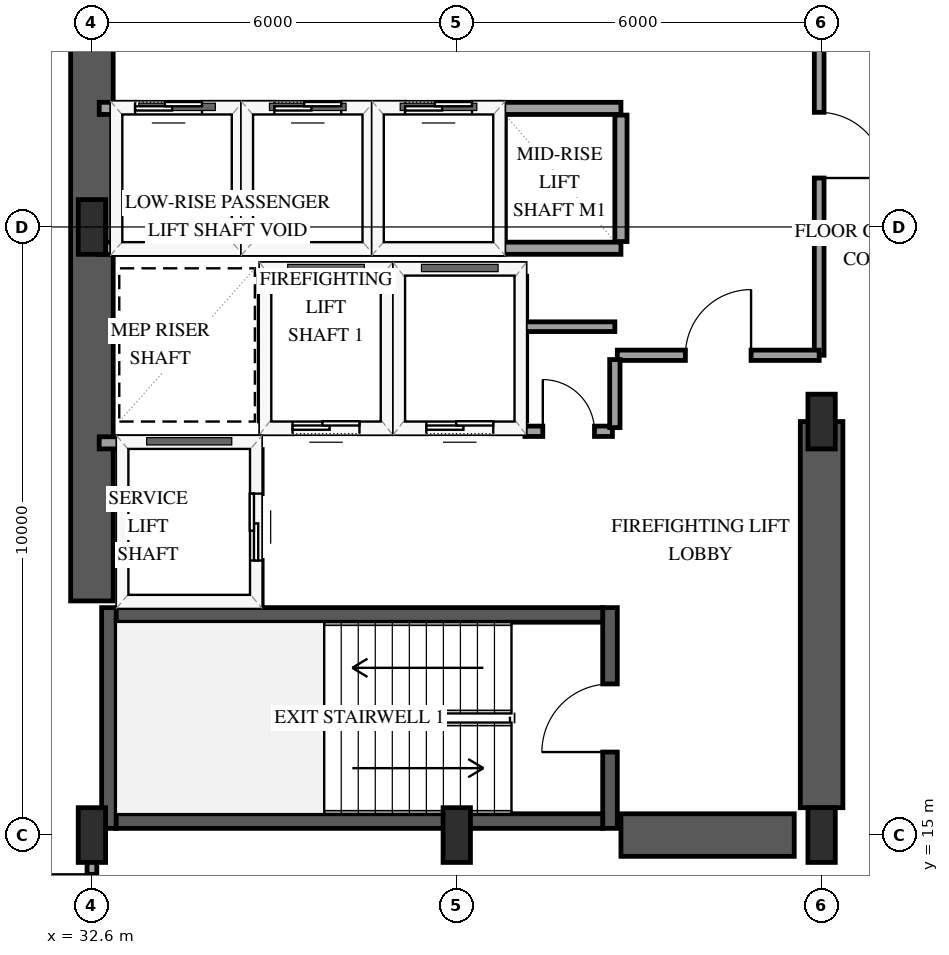
"""IFC4 building model, lengths in metres.
Left out: names, types, materials, properties, quantities, classifications, styles, units other than length and angle.
Written with IfcOpenShell. Run it as: python <this file> out.ifc"""

import sys

from ifc_helpers import new_model, si_unit, direction, frame, frame_2d, origin, origin_2d, place, context, subcontext, project, spatial, rectangle, extrude, element, fill, save


model = new_model("IFC4")
c1 = context("Model", 3, precision=1e-05, world=origin(), true_north=direction((0.0, 1.0)))
c2 = subcontext(c1, "Body", "Model", "MODEL_VIEW")
j1 = project(units=[si_unit("LENGTHUNIT", "METRE"), si_unit("PLANEANGLEUNIT", "RADIAN")], contexts=[c1])
p1 = place(None, origin())
s1 = spatial("IfcSite", under=j1, at=p1, CompositionType="ELEMENT")
p2 = place(p1, origin())
s2 = spatial("IfcBuilding", under=s1, at=p2, CompositionType="ELEMENT")
p3 = place(p2, frame((0.0, 0.0, 46.6)))
s3 = spatial("IfcBuildingStorey", under=s2, at=p3, CompositionType="ELEMENT", Elevation=46.6)
p4 = place(p3, frame((32.88, 15.11, 0.0), z_axis=(0.0, 0.0, 1.0), x_axis=(0.0, 1.0, 0.0)))
e1 = element("IfcWall", 1, at=p4, inside=s3, PredefinedType="SHEAR", context=c2, shape_type="SweptSolid", body=[
    extrude(rectangle(XDim=3.63, YDim=0.24, at=frame_2d((1.815, 0.0))), origin(), (0.0, 0.0, 1.0), 4.0),
])
p5 = place(p3, frame((41.12, 15.11, 0.0), z_axis=(0.0, 0.0, 1.0), x_axis=(0.0, 1.0, 0.0)))
e2 = element("IfcWall", 2, at=p5, inside=s3, PredefinedType="SHEAR", context=c2, shape_type="SweptSolid", body=[
    extrude(rectangle(XDim=3.63, YDim=0.24, at=frame_2d((1.815, 0.0))), origin(), (0.0, 0.0, 1.0), 4.0),
])
p6 = place(p5, frame((1.255, 0.0, 0.0)))
e3 = element("IfcOpeningElement", 3, at=p6, cuts=e2, PredefinedType="OPENING", context=c2, shape_type="SweptSolid", body=[
    extrude(rectangle(XDim=1.12, YDim=2.15, at=frame_2d((0.56, 1.075))), frame((0.0, 0.13, 0.0), z_axis=(0.0, -1.0, 0.0), x_axis=(1.0, 0.0, 0.0)), (0.0, 0.0, 1.0), 0.26),
])
for number, where, z_axis, x_axis in (
    (4, (33.0, 15.23, 0.0), (0.0, 0.0, 1.0), (1.0, 0.0, 0.0)),
    (5, (33.0, 18.62, 0.0), (0.0, 0.0, 1.0), (1.0, 0.0, 0.0)),
):
    element("IfcWall", number, at=place(p3, frame(where, z_axis=z_axis, x_axis=x_axis)), inside=s3, PredefinedType="SHEAR", context=c2, shape_type="SweptSolid", body=[
        extrude(rectangle(XDim=8.0, YDim=0.24, at=frame_2d((4.0, 0.0))), origin(), (0.0, 0.0, 1.0), 4.0),
    ])
p7 = place(p3, frame((32.6, 18.85, 0.0), z_axis=(0.0, 0.0, 1.0), x_axis=(0.0, 1.0, 0.0)))
e6 = element("IfcWall", 6, at=p7, inside=s3, PredefinedType="SHEAR", context=c2, shape_type="SweptSolid", body=[
    extrude(rectangle(XDim=12.3, YDim=0.7, at=frame_2d((6.15, 0.0))), origin(), (0.0, 0.0, 1.0), 4.0),
])
p8 = place(p3, frame((41.3, 15.0, 0.0), z_axis=(0.0, 0.0, 1.0), x_axis=(1.0, 0.0, 0.0)))
e7 = element("IfcWall", 7, at=p8, inside=s3, PredefinedType="SHEAR", context=c2, shape_type="SweptSolid", body=[
    extrude(rectangle(XDim=2.85, YDim=0.7, at=frame_2d((1.425, 0.0))), origin(), (0.0, 0.0, 1.0), 4.0),
])
p9 = place(p3, frame((44.6, 15.45, 0.0), z_axis=(0.0, 0.0, 1.0), x_axis=(0.0, 1.0, 0.0)))
e8 = element("IfcWall", 8, at=p9, inside=s3, PredefinedType="SHEAR", context=c2, shape_type="SweptSolid", body=[
    extrude(rectangle(XDim=6.35, YDim=0.7, at=frame_2d((3.175, 0.0))), origin(), (0.0, 0.0, 1.0), 4.0),
])
for number, where, z_axis, x_axis in (
    (9, (32.6, 15.0, 0.0), (0.0, 0.0, 1.0), (1.0, 0.0, 0.0)),
    (10, (32.6, 25.0, 0.0), (0.0, 0.0, 1.0), (1.0, 0.0, 0.0)),
    (11, (38.6, 15.0, 0.0), (0.0, 0.0, 1.0), (1.0, 0.0, 0.0)),
    (12, (44.6, 15.0, 0.0), (0.0, 0.0, 1.0), (1.0, 0.0, 0.0)),
    (13, (44.6, 21.8, 0.0), (0.0, 0.0, 1.0), (1.0, 0.0, 0.0)),
):
    element("IfcColumn", number, at=place(p3, frame(where, z_axis=z_axis, x_axis=x_axis)), inside=s3, PredefinedType="PILASTER", context=c2, shape_type="SweptSolid", body=[
        extrude(rectangle(XDim=0.45, YDim=0.9, at=origin_2d()), origin(), (0.0, 0.0, 1.0), 4.0),
    ])
p10 = place(p3, frame((35.45, 21.7, 0.0), z_axis=(0.0, 0.0, 1.0), x_axis=(1.0, 0.0, 0.0)))
e14 = element("IfcWall", 14, at=p10, inside=s3, PredefinedType="SOLIDWALL", context=c2, shape_type="SweptSolid", body=[
    extrude(rectangle(XDim=2.0, YDim=0.2, at=frame_2d((1.0, 0.0))), origin(), (0.0, 0.0, 1.0), 3.7),
])
p11 = place(p10, frame((0.45, 0.0, 0.0)))
e15 = element("IfcOpeningElement", 15, at=p11, cuts=e14, PredefinedType="OPENING", context=c2, shape_type="SweptSolid", body=[
    extrude(rectangle(XDim=1.1, YDim=2.15, at=frame_2d((0.55, 1.075))), frame((0.0, 0.11, 0.0), z_axis=(0.0, -1.0, 0.0), x_axis=(1.0, 0.0, 0.0)), (0.0, 0.0, 1.0), 0.22),
])
p12 = place(p3, frame((35.45, 24.3, 0.0), z_axis=(0.0, 0.0, 1.0), x_axis=(1.0, 0.0, 0.0)))
e16 = element("IfcWall", 16, at=p12, inside=s3, PredefinedType="SOLIDWALL", context=c2, shape_type="SweptSolid", body=[
    extrude(rectangle(XDim=2.0, YDim=0.2, at=frame_2d((1.0, 0.0))), origin(), (0.0, 0.0, 1.0), 3.7),
])
for number, where, z_axis, x_axis in (
    (17, (35.45, 21.81, 0.0), (0.0, 0.0, 1.0), (0.0, 1.0, 0.0)),
    (18, (37.45, 21.81, 0.0), (0.0, 0.0, 1.0), (0.0, 1.0, 0.0)),
):
    element("IfcWall", number, at=place(p3, frame(where, z_axis=z_axis, x_axis=x_axis)), inside=s3, PredefinedType="SOLIDWALL", context=c2, shape_type="SweptSolid", body=[
        extrude(rectangle(XDim=2.38, YDim=0.2, at=frame_2d((1.19, 0.0))), origin(), (0.0, 0.0, 1.0), 3.7),
    ])
p13 = place(p3, frame((37.65, 21.7, 0.0), z_axis=(0.0, 0.0, 1.0), x_axis=(1.0, 0.0, 0.0)))
e19 = element("IfcWall", 19, at=p13, inside=s3, PredefinedType="SOLIDWALL", context=c2, shape_type="SweptSolid", body=[
    extrude(rectangle(XDim=2.0, YDim=0.2, at=frame_2d((1.0, 0.0))), origin(), (0.0, 0.0, 1.0), 3.7),
])
p14 = place(p13, frame((0.45, 0.0, 0.0)))
e20 = element("IfcOpeningElement", 20, at=p14, cuts=e19, PredefinedType="OPENING", context=c2, shape_type="SweptSolid", body=[
    extrude(rectangle(XDim=1.1, YDim=2.15, at=frame_2d((0.55, 1.075))), frame((0.0, 0.11, 0.0), z_axis=(0.0, -1.0, 0.0), x_axis=(1.0, 0.0, 0.0)), (0.0, 0.0, 1.0), 0.22),
])
p15 = place(p3, frame((37.65, 24.3, 0.0), z_axis=(0.0, 0.0, 1.0), x_axis=(1.0, 0.0, 0.0)))
e21 = element("IfcWall", 21, at=p15, inside=s3, PredefinedType="SOLIDWALL", context=c2, shape_type="SweptSolid", body=[
    extrude(rectangle(XDim=2.0, YDim=0.2, at=frame_2d((1.0, 0.0))), origin(), (0.0, 0.0, 1.0), 3.7),
])
p16 = place(p3, frame((39.65, 21.81, 0.0), z_axis=(0.0, 0.0, 1.0), x_axis=(0.0, 1.0, 0.0)))
e22 = element("IfcWall", 22, at=p16, inside=s3, PredefinedType="SOLIDWALL", context=c2, shape_type="SweptSolid", body=[
    extrude(rectangle(XDim=2.38, YDim=0.2, at=frame_2d((1.19, 0.0))), origin(), (0.0, 0.0, 1.0), 3.7),
])
p17 = place(p3, frame((32.72, 21.45, 0.0), z_axis=(0.0, 0.0, 1.0), x_axis=(1.0, 0.0, 0.0)))
e23 = element("IfcWall", 23, at=p17, inside=s3, PredefinedType="SOLIDWALL", context=c2, shape_type="SweptSolid", body=[
    extrude(rectangle(XDim=2.58, YDim=0.2, at=frame_2d((1.29, 0.0))), origin(), (0.0, 0.0, 1.0), 3.7),
])
p18 = place(p3, frame((35.3, 18.79, 0.0), z_axis=(0.0, 0.0, 1.0), x_axis=(0.0, 1.0, 0.0)))
e24 = element("IfcWall", 24, at=p18, inside=s3, PredefinedType="SOLIDWALL", context=c2, shape_type="SweptSolid", body=[
    extrude(rectangle(XDim=2.55, YDim=0.2, at=frame_2d((1.275, 0.0))), origin(), (0.0, 0.0, 1.0), 3.7),
])
p19 = place(p18, frame((0.725, 0.0, 0.0)))
e25 = element("IfcOpeningElement", 25, at=p19, cuts=e24, PredefinedType="OPENING", context=c2, shape_type="SweptSolid", body=[
    extrude(rectangle(XDim=1.1, YDim=2.15, at=frame_2d((0.55, 1.075))), frame((0.0, 0.11, 0.0), z_axis=(0.0, -1.0, 0.0), x_axis=(1.0, 0.0, 0.0)), (0.0, 0.0, 1.0), 0.22),
])
p20 = place(p3, frame((32.72, 24.65, 0.0), z_axis=(0.0, 0.0, 1.0), x_axis=(1.0, 0.0, 0.0)))
e26 = element("IfcWall", 26, at=p20, inside=s3, PredefinedType="SOLIDWALL", context=c2, shape_type="SweptSolid", body=[
    extrude(rectangle(XDim=2.28, YDim=0.2, at=frame_2d((1.14, 0.0))), origin(), (0.0, 0.0, 1.0), 3.7),
])
p21 = place(p3, frame((32.72, 26.95, 0.0), z_axis=(0.0, 0.0, 1.0), x_axis=(1.0, 0.0, 0.0)))
e27 = element("IfcWall", 27, at=p21, inside=s3, PredefinedType="SOLIDWALL", context=c2, shape_type="SweptSolid", body=[
    extrude(rectangle(XDim=2.28, YDim=0.2, at=frame_2d((1.14, 0.0))), origin(), (0.0, 0.0, 1.0), 3.7),
])
p22 = place(p21, frame((0.59, 0.0, 0.0)))
e28 = element("IfcOpeningElement", 28, at=p22, cuts=e27, PredefinedType="OPENING", context=c2, shape_type="SweptSolid", body=[
    extrude(rectangle(XDim=1.1, YDim=2.15, at=frame_2d((0.55, 1.075))), frame((0.0, 0.11, 0.0), z_axis=(0.0, -1.0, 0.0), x_axis=(1.0, 0.0, 0.0)), (0.0, 0.0, 1.0), 0.22),
])
p23 = place(p3, frame((35.0, 24.76, 0.0), z_axis=(0.0, 0.0, 1.0), x_axis=(0.0, 1.0, 0.0)))
e29 = element("IfcWall", 29, at=p23, inside=s3, PredefinedType="SOLIDWALL", context=c2, shape_type="SweptSolid", body=[
    extrude(rectangle(XDim=2.08, YDim=0.2, at=frame_2d((1.04, 0.0))), origin(), (0.0, 0.0, 1.0), 3.7),
])
p24 = place(p3, frame((35.15, 24.65, 0.0), z_axis=(0.0, 0.0, 1.0), x_axis=(1.0, 0.0, 0.0)))
e30 = element("IfcWall", 30, at=p24, inside=s3, PredefinedType="SOLIDWALL", context=c2, shape_type="SweptSolid", body=[
    extrude(rectangle(XDim=2.0, YDim=0.2, at=frame_2d((1.0, 0.0))), origin(), (0.0, 0.0, 1.0), 3.7),
])
p25 = place(p3, frame((35.15, 26.95, 0.0), z_axis=(0.0, 0.0, 1.0), x_axis=(1.0, 0.0, 0.0)))
e31 = element("IfcWall", 31, at=p25, inside=s3, PredefinedType="SOLIDWALL", context=c2, shape_type="SweptSolid", body=[
    extrude(rectangle(XDim=2.0, YDim=0.2, at=frame_2d((1.0, 0.0))), origin(), (0.0, 0.0, 1.0), 3.7),
])
p26 = place(p25, frame((0.45, 0.0, 0.0)))
e32 = element("IfcOpeningElement", 32, at=p26, cuts=e31, PredefinedType="OPENING", context=c2, shape_type="SweptSolid", body=[
    extrude(rectangle(XDim=1.1, YDim=2.15, at=frame_2d((0.55, 1.075))), frame((0.0, 0.11, 0.0), z_axis=(0.0, -1.0, 0.0), x_axis=(1.0, 0.0, 0.0)), (0.0, 0.0, 1.0), 0.22),
])
p27 = place(p3, frame((37.15, 24.76, 0.0), z_axis=(0.0, 0.0, 1.0), x_axis=(0.0, 1.0, 0.0)))
e33 = element("IfcWall", 33, at=p27, inside=s3, PredefinedType="SOLIDWALL", context=c2, shape_type="SweptSolid", body=[
    extrude(rectangle(XDim=2.08, YDim=0.2, at=frame_2d((1.04, 0.0))), origin(), (0.0, 0.0, 1.0), 3.7),
])
p28 = place(p3, frame((37.3, 24.65, 0.0), z_axis=(0.0, 0.0, 1.0), x_axis=(1.0, 0.0, 0.0)))
e34 = element("IfcWall", 34, at=p28, inside=s3, PredefinedType="SOLIDWALL", context=c2, shape_type="SweptSolid", body=[
    extrude(rectangle(XDim=2.0, YDim=0.2, at=frame_2d((1.0, 0.0))), origin(), (0.0, 0.0, 1.0), 3.7),
])
p29 = place(p3, frame((37.3, 26.95, 0.0), z_axis=(0.0, 0.0, 1.0), x_axis=(1.0, 0.0, 0.0)))
e35 = element("IfcWall", 35, at=p29, inside=s3, PredefinedType="SOLIDWALL", context=c2, shape_type="SweptSolid", body=[
    extrude(rectangle(XDim=2.0, YDim=0.2, at=frame_2d((1.0, 0.0))), origin(), (0.0, 0.0, 1.0), 3.7),
])
p30 = place(p29, frame((0.45, 0.0, 0.0)))
e36 = element("IfcOpeningElement", 36, at=p30, cuts=e35, PredefinedType="OPENING", context=c2, shape_type="SweptSolid", body=[
    extrude(rectangle(XDim=1.1, YDim=2.15, at=frame_2d((0.55, 1.075))), frame((0.0, 0.11, 0.0), z_axis=(0.0, -1.0, 0.0), x_axis=(1.0, 0.0, 0.0)), (0.0, 0.0, 1.0), 0.22),
])
p31 = place(p3, frame((39.3, 24.76, 0.0), z_axis=(0.0, 0.0, 1.0), x_axis=(0.0, 1.0, 0.0)))
e37 = element("IfcWall", 37, at=p31, inside=s3, PredefinedType="SOLIDWALL", context=c2, shape_type="SweptSolid", body=[
    extrude(rectangle(XDim=2.08, YDim=0.2, at=frame_2d((1.04, 0.0))), origin(), (0.0, 0.0, 1.0), 3.7),
])
for number, where, z_axis, x_axis in (
    (38, (39.3, 24.65, 0.0), (0.0, 0.0, 1.0), (1.0, 0.0, 0.0)),
    (39, (39.3, 26.95, 0.0), (0.0, 0.0, 1.0), (1.0, 0.0, 0.0)),
):
    element("IfcWall", number, at=place(p3, frame(where, z_axis=z_axis, x_axis=x_axis)), inside=s3, PredefinedType="SOLIDWALL", context=c2, shape_type="SweptSolid", body=[
        extrude(rectangle(XDim=2.0, YDim=0.2, at=frame_2d((1.0, 0.0))), origin(), (0.0, 0.0, 1.0), 3.7),
    ])
p32 = place(p3, frame((41.3, 24.76, 0.0), z_axis=(0.0, 0.0, 1.0), x_axis=(0.0, 1.0, 0.0)))
e40 = element("IfcWall", 40, at=p32, inside=s3, PredefinedType="SOLIDWALL", context=c2, shape_type="SweptSolid", body=[
    extrude(rectangle(XDim=2.08, YDim=0.2, at=frame_2d((1.04, 0.0))), origin(), (0.0, 0.0, 1.0), 3.7),
])
p33 = place(p3, frame((44.56, 29.8, 0.0), z_axis=(0.0, 0.0, 1.0), x_axis=(0.0, -1.0, 0.0)))
e41 = element("IfcWall", 41, at=p33, inside=s3, PredefinedType="PARTITIONING", context=c2, shape_type="SweptSolid", body=[
    extrude(rectangle(XDim=6.91, YDim=0.16, at=frame_2d((3.455, 0.0))), origin(), (0.0, 0.0, 1.0), 2.74),
])
p34 = place(p33, frame((2.915, 0.0, 0.0)))
e42 = element("IfcOpeningElement", 42, at=p34, cuts=e41, PredefinedType="OPENING", context=c2, shape_type="SweptSolid", body=[
    extrude(rectangle(XDim=1.08, YDim=2.15, at=frame_2d((0.54, 1.075))), frame((0.0, 0.09, 0.0), z_axis=(0.0, -1.0, 0.0), x_axis=(1.0, 0.0, 0.0)), (0.0, 0.0, 1.0), 0.18),
])
p35 = place(p3, frame((41.24, 22.89, 0.0), z_axis=(0.0, 0.0, 1.0), x_axis=(1.0, 0.0, 0.0)))
e43 = element("IfcWall", 43, at=p35, inside=s3, PredefinedType="PARTITIONING", context=c2, shape_type="SweptSolid", body=[
    extrude(rectangle(XDim=3.32, YDim=0.17, at=frame_2d((1.66, 0.0))), origin(), (0.0, 0.0, 1.0), 3.7),
])
p36 = place(p35, frame((1.12, 0.0, 0.0)))
e44 = element("IfcOpeningElement", 44, at=p36, cuts=e43, PredefinedType="OPENING", context=c2, shape_type="SweptSolid", body=[
    extrude(rectangle(XDim=1.08, YDim=2.15, at=frame_2d((0.54, 1.075))), frame((0.0, 0.095, 0.0), z_axis=(0.0, -1.0, 0.0), x_axis=(1.0, 0.0, 0.0)), (0.0, 0.0, 1.0), 0.19),
])
p37 = place(p3, frame((32.6, 13.02, 0.0), z_axis=(0.0, 0.0, 1.0), x_axis=(0.0, 1.0, 0.0)))
e45 = element("IfcWall", 45, at=p37, inside=s3, PredefinedType="PARTITIONING", context=c2, shape_type="SweptSolid", body=[
    extrude(rectangle(XDim=1.91, YDim=0.16, at=frame_2d((0.955, 0.0))), origin(), (0.0, 0.0, 1.0), 3.7),
])
p38 = place(p37, frame((0.384, 0.0, 0.0)))
e46 = element("IfcOpeningElement", 46, at=p38, cuts=e45, PredefinedType="OPENING", context=c2, shape_type="SweptSolid", body=[
    extrude(rectangle(XDim=0.95, YDim=2.15, at=frame_2d((0.475, 1.075))), frame((0.0, 0.09, 0.0), z_axis=(0.0, -1.0, 0.0), x_axis=(1.0, 0.0, 0.0)), (0.0, 0.0, 1.0), 0.18),
])
p39 = place(p3, frame((39.72, 21.64, 0.0), z_axis=(0.0, 0.0, 1.0), x_axis=(1.0, 0.0, 0.0)))
e47 = element("IfcWall", 47, at=p39, inside=s3, PredefinedType="PARTITIONING", context=c2, shape_type="SweptSolid", body=[
    extrude(rectangle(XDim=1.44, YDim=0.17, at=frame_2d((0.72, 0.0))), origin(), (0.0, 0.0, 1.0), 3.7),
])
p40 = place(p39, frame((0.295, 0.0, 0.0)))
e48 = element("IfcOpeningElement", 48, at=p40, cuts=e47, PredefinedType="OPENING", context=c2, shape_type="SweptSolid", body=[
    extrude(rectangle(XDim=0.85, YDim=2.1, at=frame_2d((0.425, 1.05))), frame((0.0, 0.095, 0.0), z_axis=(0.0, -1.0, 0.0), x_axis=(1.0, 0.0, 0.0)), (0.0, 0.0, 1.0), 0.19),
])
p41 = place(p3, frame((41.2, 21.7, 0.0), z_axis=(0.0, 0.0, 1.0), x_axis=(0.0, 1.0, 0.0)))
e49 = element("IfcWall", 49, at=p41, inside=s3, PredefinedType="PARTITIONING", context=c2, shape_type="SweptSolid", body=[
    extrude(rectangle(XDim=1.12, YDim=0.17, at=frame_2d((0.56, 0.0))), origin(), (0.0, 0.0, 1.0), 3.7),
])
p42 = place(p3, frame((41.2, 23.36, 0.0), z_axis=(0.0, 0.0, 1.0), x_axis=(-1.0, 0.0, 0.0)))
e50 = element("IfcWall", 50, at=p42, inside=s3, PredefinedType="PARTITIONING", context=c2, shape_type="SweptSolid", body=[
    extrude(rectangle(XDim=1.48, YDim=0.16, at=frame_2d((0.74, 0.0))), origin(), (0.0, 0.0, 1.0), 3.7),
])
p43 = place(p11, origin())
e51 = element("IfcDoor", 51, at=p43, inside=s3, OperationType="SLIDING_TO_LEFT", PredefinedType="DOOR", context=c2, shape_type="SweptSolid", body=[
    extrude(rectangle(XDim=1.1, YDim=2.15, at=frame_2d((0.55, 1.075))), frame((0.0, 0.025, 0.0), z_axis=(0.0, -1.0, 0.0), x_axis=(1.0, 0.0, 0.0)), (0.0, 0.0, 1.0), 0.05),
])
fill(e15, e51)
p44 = place(p14, origin())
e52 = element("IfcDoor", 52, at=p44, inside=s3, OperationType="SLIDING_TO_LEFT", PredefinedType="DOOR", context=c2, shape_type="SweptSolid", body=[
    extrude(rectangle(XDim=1.1, YDim=2.15, at=frame_2d((0.55, 1.075))), frame((0.0, 0.025, 0.0), z_axis=(0.0, -1.0, 0.0), x_axis=(1.0, 0.0, 0.0)), (0.0, 0.0, 1.0), 0.05),
])
fill(e20, e52)
p45 = place(p19, origin())
e53 = element("IfcDoor", 53, at=p45, inside=s3, OperationType="SLIDING_TO_LEFT", PredefinedType="DOOR", context=c2, shape_type="SweptSolid", body=[
    extrude(rectangle(XDim=1.1, YDim=2.15, at=frame_2d((0.55, 1.075))), frame((0.0, 0.025, 0.0), z_axis=(0.0, -1.0, 0.0), x_axis=(1.0, 0.0, 0.0)), (0.0, 0.0, 1.0), 0.05),
])
fill(e25, e53)
p46 = place(p22, origin())
e54 = element("IfcDoor", 54, at=p46, inside=s3, OperationType="SLIDING_TO_LEFT", PredefinedType="DOOR", context=c2, shape_type="SweptSolid", body=[
    extrude(rectangle(XDim=1.1, YDim=2.15, at=frame_2d((0.55, 1.075))), frame((0.0, 0.025, 0.0), z_axis=(0.0, -1.0, 0.0), x_axis=(1.0, 0.0, 0.0)), (0.0, 0.0, 1.0), 0.05),
])
fill(e28, e54)
p47 = place(p26, origin())
e55 = element("IfcDoor", 55, at=p47, inside=s3, OperationType="SLIDING_TO_LEFT", PredefinedType="DOOR", context=c2, shape_type="SweptSolid", body=[
    extrude(rectangle(XDim=1.1, YDim=2.15, at=frame_2d((0.55, 1.075))), frame((0.0, 0.025, 0.0), z_axis=(0.0, -1.0, 0.0), x_axis=(1.0, 0.0, 0.0)), (0.0, 0.0, 1.0), 0.05),
])
fill(e32, e55)
p48 = place(p30, origin())
e56 = element("IfcDoor", 56, at=p48, inside=s3, OperationType="SLIDING_TO_LEFT", PredefinedType="DOOR", context=c2, shape_type="SweptSolid", body=[
    extrude(rectangle(XDim=1.1, YDim=2.15, at=frame_2d((0.55, 1.075))), frame((0.0, 0.025, 0.0), z_axis=(0.0, -1.0, 0.0), x_axis=(1.0, 0.0, 0.0)), (0.0, 0.0, 1.0), 0.05),
])
fill(e36, e56)
p49 = place(p6, origin())
e57 = element("IfcDoor", 57, at=p49, inside=s3, OperationType="SINGLE_SWING_LEFT", PredefinedType="DOOR", context=c2, shape_type="SweptSolid", body=[
    extrude(rectangle(XDim=1.12, YDim=2.15, at=frame_2d((0.56, 1.075))), frame((0.0, 0.025, 0.0), z_axis=(0.0, -1.0, 0.0), x_axis=(1.0, 0.0, 0.0)), (0.0, 0.0, 1.0), 0.05),
])
fill(e3, e57)
p50 = place(p34, origin())
e58 = element("IfcDoor", 58, at=p50, inside=s3, OperationType="SINGLE_SWING_RIGHT", PredefinedType="DOOR", context=c2, shape_type="SweptSolid", body=[
    extrude(rectangle(XDim=1.08, YDim=2.15, at=frame_2d((0.54, 1.075))), frame((0.0, 0.025, 0.0), z_axis=(0.0, -1.0, 0.0), x_axis=(1.0, 0.0, 0.0)), (0.0, 0.0, 1.0), 0.05),
])
fill(e42, e58)
p51 = place(p36, origin())
e59 = element("IfcDoor", 59, at=p51, inside=s3, OperationType="SINGLE_SWING_RIGHT", PredefinedType="DOOR", context=c2, shape_type="SweptSolid", body=[
    extrude(rectangle(XDim=1.08, YDim=2.15, at=frame_2d((0.54, 1.075))), frame((0.0, 0.025, 0.0), z_axis=(0.0, -1.0, 0.0), x_axis=(1.0, 0.0, 0.0)), (0.0, 0.0, 1.0), 0.05),
])
fill(e44, e59)
p52 = place(p38, origin())
e60 = element("IfcDoor", 60, at=p52, inside=s3, OperationType="SINGLE_SWING_RIGHT", PredefinedType="DOOR", context=c2, shape_type="SweptSolid", body=[
    extrude(rectangle(XDim=0.95, YDim=2.15, at=frame_2d((0.475, 1.075))), frame((0.0, 0.025, 0.0), z_axis=(0.0, -1.0, 0.0), x_axis=(1.0, 0.0, 0.0)), (0.0, 0.0, 1.0), 0.05),
])
fill(e46, e60)
p53 = place(p40, origin())
e61 = element("IfcDoor", 61, at=p53, inside=s3, OperationType="SINGLE_SWING_LEFT", PredefinedType="DOOR", context=c2, shape_type="SweptSolid", body=[
    extrude(rectangle(XDim=0.85, YDim=2.1, at=frame_2d((0.425, 1.05))), frame((0.0, 0.025, 0.0), z_axis=(0.0, -1.0, 0.0), x_axis=(1.0, 0.0, 0.0)), (0.0, 0.0, 1.0), 0.05),
])
fill(e48, e61)
save(model, sys.argv[1])
